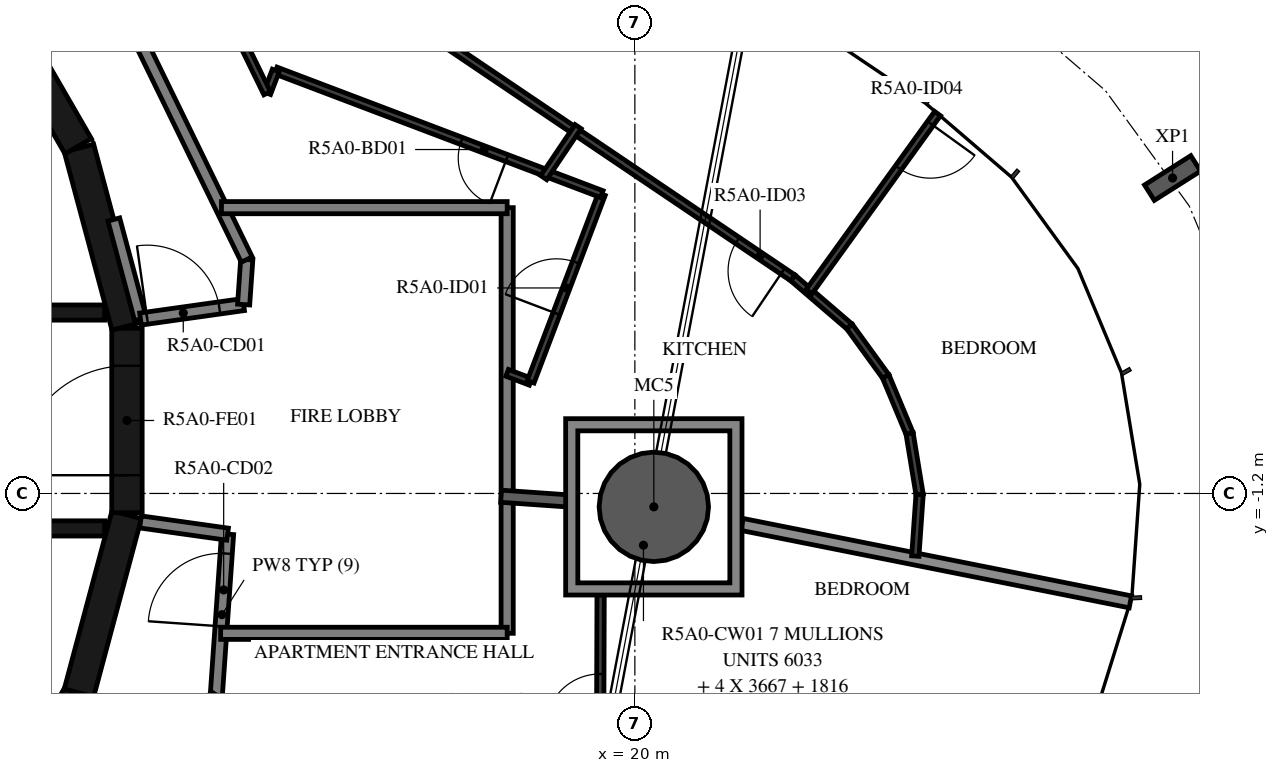
"""IFC4 building model, lengths in metres.
Left out: names, types, materials, properties, quantities, classifications, styles, units other than length and angle.
Written with IfcOpenShell. Run it as: python <this file> out.ifc"""

import sys

from ifc_helpers import new_model, si_unit, direction, frame, frame_2d, origin, origin_2d, place, context, subcontext, project, spatial, polyline, rectangle, hollow_circle, i_section, outline, extrude, element, fill, save


model = new_model("IFC4")
c1 = context("Model", 3, precision=1e-05, world=origin(), true_north=direction((0.0, 1.0)))
c2 = subcontext(c1, "Body", "Model", "MODEL_VIEW")
j1 = project(units=[si_unit("LENGTHUNIT", "METRE"), si_unit("PLANEANGLEUNIT", "RADIAN")], contexts=[c1])
p1 = place(None, origin())
s1 = spatial("IfcSite", under=j1, at=p1, CompositionType="ELEMENT")
p2 = place(p1, origin())
s2 = spatial("IfcBuilding", under=s1, at=p2, CompositionType="ELEMENT")
p3 = place(p2, frame((0.0, 0.0, 195.4)))
s3 = spatial("IfcBuildingStorey", under=s2, at=p3, CompositionType="ELEMENT", Elevation=195.4)
p4 = place(p3, frame((20.312, -1.42, -0.38), z_axis=(0.0, 0.0, 1.0), x_axis=(1.0, 0.0, 0.0)))
e1 = element("IfcColumn", 1, at=p4, inside=s3, PredefinedType="COLUMN", context=c2, shape_type="SweptSolid", body=[
    extrude(hollow_circle(Radius=0.9, WallThickness=0.04, at=origin_2d()), origin(), (0.0, 0.0, 1.0), 3.5),
])
p5 = place(p3, frame((28.842, 3.987, -0.38), z_axis=(0.0, 0.0, 1.0), x_axis=(0.535400283339, -0.844598446956, 0.0)))
e2 = element("IfcColumn", 2, at=p5, inside=s3, PredefinedType="COLUMN", context=c2, shape_type="SweptSolid", body=[
    extrude(i_section(OverallWidth=0.3, OverallDepth=0.9, WebThickness=0.019, FlangeThickness=0.035, FilletRadius=0.03, at=origin_2d()), origin(), (0.0, 0.0, 1.0), 3.5),
])
for number, where, z_axis, x_axis in (
    (3, (9.329, -7.137, 0.0), (0.0, 0.0, 1.0), (0.5, 0.866, 0.0)),
    (4, (10.858, -4.479, 0.0), (0.0, 0.0, 1.0), (0.259, 0.966, 0.0)),
):
    element("IfcWall", number, at=place(p3, frame(where, z_axis=z_axis, x_axis=x_axis)), inside=s3, PredefinedType="SHEAR", context=c2, shape_type="SweptSolid", body=[
        extrude(rectangle(XDim=3.033, YDim=0.5, at=frame_2d((1.516, 0.0))), origin(), (0.0, 0.0, 1.0), 3.12),
    ])
p6 = place(p3, frame((11.647, -1.516, 0.0), z_axis=(0.0, 0.0, 1.0), x_axis=(0.0, 1.0, 0.0)))
e5 = element("IfcWall", 5, at=p6, inside=s3, PredefinedType="SHEAR", context=c2, shape_type="SweptSolid", body=[
    extrude(rectangle(XDim=3.033, YDim=0.5, at=frame_2d((1.516, 0.0))), origin(), (0.0, 0.0, 1.0), 3.12),
])
p7 = place(p6, frame((0.616, 0.0, 0.0)))
e6 = element("IfcOpeningElement", 6, at=p7, cuts=e5, PredefinedType="OPENING", context=c2, shape_type="SweptSolid", body=[
    extrude(rectangle(XDim=1.8, YDim=2.1, at=frame_2d((0.9, 1.05))), frame((0.0, 0.26, 0.0), z_axis=(0.0, -1.0, 0.0), x_axis=(1.0, 0.0, 0.0)), (0.0, 0.0, 1.0), 0.52),
])
for number, where, z_axis, x_axis in (
    (7, (11.643, 1.55, 0.0), (0.0, 0.0, 1.0), (-0.259, 0.966, 0.0)),
    (8, (10.845, 4.51, 0.0), (0.0, 0.0, 1.0), (-0.5, 0.866, 0.0)),
):
    element("IfcWall", number, at=place(p3, frame(where, z_axis=z_axis, x_axis=x_axis)), inside=s3, PredefinedType="SHEAR", context=c2, shape_type="SweptSolid", body=[
        extrude(rectangle(XDim=3.033, YDim=0.5, at=frame_2d((1.516, 0.0))), origin(), (0.0, 0.0, 1.0), 3.12),
    ])
p8 = place(p3, frame((3.35, 1.775, 0.0), z_axis=(0.0, 0.0, 1.0), x_axis=(1.0, 0.0, 0.0)))
e9 = element("IfcWall", 9, at=p8, inside=s3, PredefinedType="SHEAR", context=c2, shape_type="SweptSolid", body=[
    extrude(rectangle(XDim=7.93, YDim=0.25, at=frame_2d((3.965, 0.0))), origin(), (0.0, 0.0, 1.0), 3.12),
])
p9 = place(p8, frame((0.35, 0.0, 0.0)))
e10 = element("IfcOpeningElement", 10, at=p9, cuts=e9, PredefinedType="OPENING", context=c2, shape_type="SweptSolid", body=[
    extrude(rectangle(XDim=1.2, YDim=2.4, at=frame_2d((0.6, 1.2))), frame((0.0, 0.135, 0.0), z_axis=(0.0, -1.0, 0.0), x_axis=(1.0, 0.0, 0.0)), (0.0, 0.0, 1.0), 0.27),
])
p10 = place(p8, frame((2.5, 0.0, 0.0)))
e11 = element("IfcOpeningElement", 11, at=p10, cuts=e9, PredefinedType="OPENING", context=c2, shape_type="SweptSolid", body=[
    extrude(rectangle(XDim=1.2, YDim=2.4, at=frame_2d((0.6, 1.2))), frame((0.0, 0.135, 0.0), z_axis=(0.0, -1.0, 0.0), x_axis=(1.0, 0.0, 0.0)), (0.0, 0.0, 1.0), 0.27),
])
p11 = place(p8, frame((4.8, 0.0, 0.0)))
e12 = element("IfcOpeningElement", 12, at=p11, cuts=e9, PredefinedType="OPENING", context=c2, shape_type="SweptSolid", body=[
    extrude(rectangle(XDim=0.9, YDim=2.1, at=frame_2d((0.45, 1.05))), frame((0.0, 0.135, 0.0), z_axis=(0.0, -1.0, 0.0), x_axis=(1.0, 0.0, 0.0)), (0.0, 0.0, 1.0), 0.27),
])
p12 = place(p3, frame((3.35, -1.775, 0.0), z_axis=(0.0, 0.0, 1.0), x_axis=(1.0, 0.0, 0.0)))
e13 = element("IfcWall", 13, at=p12, inside=s3, PredefinedType="SHEAR", context=c2, shape_type="SweptSolid", body=[
    extrude(rectangle(XDim=7.93, YDim=0.25, at=frame_2d((3.965, 0.0))), origin(), (0.0, 0.0, 1.0), 3.12),
])
p13 = place(p12, frame((0.4, 0.0, 0.0)))
e14 = element("IfcOpeningElement", 14, at=p13, cuts=e13, PredefinedType="OPENING", context=c2, shape_type="SweptSolid", body=[
    extrude(rectangle(XDim=1.1, YDim=2.4, at=frame_2d((0.55, 1.2))), frame((0.0, 0.135, 0.0), z_axis=(0.0, -1.0, 0.0), x_axis=(1.0, 0.0, 0.0)), (0.0, 0.0, 1.0), 0.27),
])
p14 = place(p12, frame((2.55, 0.0, 0.0)))
e15 = element("IfcOpeningElement", 15, at=p14, cuts=e13, PredefinedType="OPENING", context=c2, shape_type="SweptSolid", body=[
    extrude(rectangle(XDim=1.1, YDim=2.4, at=frame_2d((0.55, 1.2))), frame((0.0, 0.135, 0.0), z_axis=(0.0, -1.0, 0.0), x_axis=(1.0, 0.0, 0.0)), (0.0, 0.0, 1.0), 0.27),
])
p15 = place(p12, frame((4.7, 0.0, 0.0)))
e16 = element("IfcOpeningElement", 16, at=p15, cuts=e13, PredefinedType="OPENING", context=c2, shape_type="SweptSolid", body=[
    extrude(rectangle(XDim=1.1, YDim=2.4, at=frame_2d((0.55, 1.2))), frame((0.0, 0.135, 0.0), z_axis=(0.0, -1.0, 0.0), x_axis=(1.0, 0.0, 0.0)), (0.0, 0.0, 1.0), 0.27),
])
p16 = place(p3, frame((11.87, 1.668, 0.0), z_axis=(0.0, 0.0, 1.0), x_axis=(-0.258836880648, 0.965921047093, 0.0)))
e17 = element("IfcWall", 17, at=p16, inside=s3, PredefinedType="STANDARD", context=c2, shape_type="SweptSolid", body=[
    extrude(rectangle(XDim=1.695, YDim=0.2, at=frame_2d((0.848, 0.0))), origin(), (0.0, 0.0, 1.0), 3.12),
])
p17 = place(p3, frame((11.87, 1.668, 0.0), z_axis=(0.0, 0.0, 1.0), x_axis=(0.990271931984, 0.139145609792, 0.0)))
e18 = element("IfcWall", 18, at=p17, inside=s3, PredefinedType="STANDARD", context=c2, shape_type="SweptSolid", body=[
    extrude(rectangle(XDim=1.712, YDim=0.2, at=frame_2d((0.856, 0.0))), origin(), (0.0, 0.0, 1.0), 3.12),
])
p18 = place(p17, frame((0.11, 0.0, 0.0)))
e19 = element("IfcOpeningElement", 19, at=p18, cuts=e18, PredefinedType="OPENING", context=c2, shape_type="SweptSolid", body=[
    extrude(rectangle(XDim=1.2, YDim=2.1, at=frame_2d((0.6, 1.05))), frame((0.0, 0.11, 0.0), z_axis=(0.0, -1.0, 0.0), x_axis=(1.0, 0.0, 0.0)), (0.0, 0.0, 1.0), 0.22),
])
p19 = place(p3, frame((13.566, 1.906, 0.0), z_axis=(0.0, 0.0, 1.0), x_axis=(0.07005495793, 0.997543133338, 0.0)))
e20 = element("IfcWall", 20, at=p19, inside=s3, PredefinedType="STANDARD", context=c2, shape_type="SweptSolid", body=[
    extrude(rectangle(XDim=0.742, YDim=0.2, at=frame_2d((0.371, 0.0))), origin(), (0.0, 0.0, 1.0), 3.12),
])
p20 = place(p3, frame((13.618, 2.647, 0.0), z_axis=(0.0, 0.0, 1.0), x_axis=(-0.438366026218, 0.898796543751, 0.0)))
e21 = element("IfcWall", 21, at=p20, inside=s3, PredefinedType="STANDARD", context=c2, shape_type="SweptSolid", body=[
    extrude(rectangle(XDim=7.181, YDim=0.2, at=frame_2d((3.591, 0.0))), origin(), (0.0, 0.0, 1.0), 3.12),
])
p21 = place(p3, frame((13.117, -4.517, 0.0), z_axis=(0.0, 0.0, 1.0), x_axis=(0.069736659613, 0.997565435601, 0.0)))
e22 = element("IfcWall", 22, at=p21, inside=s3, PredefinedType="STANDARD", context=c2, shape_type="SweptSolid", body=[
    extrude(rectangle(XDim=2.654, YDim=0.2, at=frame_2d((1.327, 0.0))), origin(), (0.0, 0.0, 1.0), 3.12),
])
p22 = place(p21, frame((1.134, 0.0, 0.0)))
e23 = element("IfcOpeningElement", 23, at=p22, cuts=e22, PredefinedType="OPENING", context=c2, shape_type="SweptSolid", body=[
    extrude(rectangle(XDim=1.2, YDim=2.1, at=frame_2d((0.6, 1.05))), frame((0.0, 0.11, 0.0), z_axis=(0.0, -1.0, 0.0), x_axis=(1.0, 0.0, 0.0)), (0.0, 0.0, 1.0), 0.22),
])
p23 = place(p3, frame((13.302, -1.869, 0.0), z_axis=(0.0, 0.0, 1.0), x_axis=(-0.990274397042, 0.13912806533, 0.0)))
e24 = element("IfcWall", 24, at=p23, inside=s3, PredefinedType="STANDARD", context=c2, shape_type="SweptSolid", body=[
    extrude(rectangle(XDim=1.446, YDim=0.2, at=frame_2d((0.723, 0.0))), origin(), (0.0, 0.0, 1.0), 3.12),
])
p24 = place(p3, frame((9.101, -10.47, 0.0), z_axis=(0.0, 0.0, 1.0), x_axis=(0.559195469534, 0.829035841718, 0.0)))
e25 = element("IfcWall", 25, at=p24, inside=s3, PredefinedType="STANDARD", context=c2, shape_type="SweptSolid", body=[
    extrude(rectangle(XDim=7.181, YDim=0.2, at=frame_2d((3.591, 0.0))), origin(), (0.0, 0.0, 1.0), 3.12),
])
p25 = place(p3, frame((17.9, -3.5, 0.0), z_axis=(0.0, 0.0, 1.0), x_axis=(0.0, 1.0, 0.0)))
e26 = element("IfcWall", 26, at=p25, inside=s3, PredefinedType="STANDARD", context=c2, shape_type="SweptSolid", body=[
    extrude(rectangle(XDim=7.0, YDim=0.2, at=frame_2d((3.5, 0.0))), origin(), (0.0, 0.0, 1.0), 3.12),
])
p26 = place(p3, frame((17.9, 3.5, 0.0), z_axis=(0.0, 0.0, 1.0), x_axis=(-1.0, 0.0, 0.0)))
e27 = element("IfcWall", 27, at=p26, inside=s3, PredefinedType="STANDARD", context=c2, shape_type="SweptSolid", body=[
    extrude(rectangle(XDim=4.698, YDim=0.2, at=frame_2d((2.349, 0.0))), origin(), (0.0, 0.0, 1.0), 3.12),
])
p27 = place(p3, frame((13.188, -3.5, 0.0), z_axis=(0.0, 0.0, 1.0), x_axis=(1.0, 0.0, 0.0)))
e28 = element("IfcWall", 28, at=p27, inside=s3, PredefinedType="STANDARD", context=c2, shape_type="SweptSolid", body=[
    extrude(rectangle(XDim=4.712, YDim=0.2, at=frame_2d((2.356, 0.0))), origin(), (0.0, 0.0, 1.0), 3.12),
])
p28 = place(p3, frame((21.762, -1.709, 0.0), z_axis=(0.0, 0.0, 1.0), x_axis=(0.980707365343, -0.195481619501, 0.0)))
e29 = element("IfcWall", 29, at=p28, inside=s3, PredefinedType="STANDARD", context=c2, shape_type="SweptSolid", body=[
    extrude(rectangle(XDim=6.512, YDim=0.2, at=frame_2d((3.256, 0.0))), origin(), (0.0, 0.0, 1.0), 2.73),
])
p29 = place(p3, frame((17.8, -1.246, 0.0), z_axis=(0.0, 0.0, 1.0), x_axis=(0.997562681713, -0.069776042122, 0.0)))
e30 = element("IfcWall", 30, at=p29, inside=s3, PredefinedType="STANDARD", context=c2, shape_type="SweptSolid", body=[
    extrude(rectangle(XDim=1.144, YDim=0.2, at=frame_2d((0.572, 0.0))), origin(), (0.0, 0.0, 1.0), 3.12),
])
p30 = place(p3, frame((17.9, 0.783, 0.0), z_axis=(0.0, 0.0, 1.0), x_axis=(0.93513272442, -0.354297597677, 0.0)))
e31 = element("IfcWall", 31, at=p30, inside=s3, PredefinedType="PARTITIONING", context=c2, shape_type="SweptSolid", body=[
    extrude(rectangle(XDim=0.413, YDim=0.12, at=frame_2d((0.207, 0.0))), origin(), (0.0, 0.0, 1.0), 3.12),
])
p31 = place(p3, frame((18.286, 0.637, 0.0), z_axis=(0.0, 0.0, 1.0), x_axis=(0.354672075988, 0.934990758518, 0.0)))
e32 = element("IfcWall", 32, at=p31, inside=s3, PredefinedType="PARTITIONING", context=c2, shape_type="SweptSolid", body=[
    extrude(rectangle(XDim=3.3, YDim=0.12, at=frame_2d((1.65, 0.0))), origin(), (0.0, 0.0, 1.0), 3.12),
])
p32 = place(p31, frame((1.2, 0.0, 0.0)))
e33 = element("IfcOpeningElement", 33, at=p32, cuts=e32, PredefinedType="OPENING", context=c2, shape_type="SweptSolid", body=[
    extrude(rectangle(XDim=0.9, YDim=2.1, at=frame_2d((0.45, 1.05))), frame((0.0, 0.07, 0.0), z_axis=(0.0, -1.0, 0.0), x_axis=(1.0, 0.0, 0.0)), (0.0, 0.0, 1.0), 0.14),
])
p33 = place(p3, frame((19.456, 3.722, 0.0), z_axis=(0.0, 0.0, 1.0), x_axis=(-0.935017484321, 0.3546016131, 0.0)))
e34 = element("IfcWall", 34, at=p33, inside=s3, PredefinedType="PARTITIONING", context=c2, shape_type="SweptSolid", body=[
    extrude(rectangle(XDim=5.734, YDim=0.12, at=frame_2d((2.867, 0.0))), origin(), (0.0, 0.0, 1.0), 3.12),
])
p34 = place(p33, frame((1.669, 0.0, 0.0)))
e35 = element("IfcOpeningElement", 35, at=p34, cuts=e34, PredefinedType="OPENING", context=c2, shape_type="SweptSolid", body=[
    extrude(rectangle(XDim=0.8, YDim=2.1, at=frame_2d((0.4, 1.05))), frame((0.0, 0.07, 0.0), z_axis=(0.0, -1.0, 0.0), x_axis=(1.0, 0.0, 0.0)), (0.0, 0.0, 1.0), 0.14),
])
p35 = place(p3, frame((14.094, 5.756, 0.0), z_axis=(0.0, 0.0, 1.0), x_axis=(-0.354267529254, -0.935144116014, 0.0)))
e36 = element("IfcWall", 36, at=p35, inside=s3, PredefinedType="PARTITIONING", context=c2, shape_type="SweptSolid", body=[
    extrude(rectangle(XDim=0.4, YDim=0.12, at=frame_2d((0.2, 0.0))), origin(), (0.0, 0.0, 1.0), 3.12),
])
p36 = place(p3, frame((13.953, 5.382, 0.0), z_axis=(0.0, 0.0, 1.0), x_axis=(-0.438382107355, 0.898788700391, 0.0)))
e37 = element("IfcWall", 37, at=p36, inside=s3, PredefinedType="PARTITIONING", context=c2, shape_type="SweptSolid", body=[
    extrude(rectangle(XDim=4.634, YDim=0.12, at=frame_2d((2.317, 0.0))), origin(), (0.0, 0.0, 1.0), 3.12),
])
p37 = place(p3, frame((22.598, 2.345, 0.0), z_axis=(0.0, 0.0, 1.0), x_axis=(0.758596166141, -0.651561092083, 0.0)))
e38 = element("IfcWall", 38, at=p37, inside=s3, PredefinedType="PARTITIONING", context=c2, shape_type="SweptSolid", body=[
    extrude(rectangle(XDim=1.227, YDim=0.12, at=frame_2d((0.614, 0.0))), origin(), (0.0, 0.0, 1.0), 3.12),
])
p38 = place(p3, frame((23.529, 1.545, 0.0), z_axis=(0.0, 0.0, 1.0), x_axis=(0.587742994292, -0.809047694923, 0.0)))
e39 = element("IfcWall", 39, at=p38, inside=s3, PredefinedType="PARTITIONING", context=c2, shape_type="SweptSolid", body=[
    extrude(rectangle(XDim=1.016, YDim=0.12, at=frame_2d((0.508, 0.0))), origin(), (0.0, 0.0, 1.0), 3.12),
])
for number, where, z_axis, x_axis in (
    (40, (24.126, 0.723, 0.0), (0.0, 0.0, 1.0), (0.385, -0.923, 0.0)),
    (41, (24.518, -0.214, 0.0), (0.0, 0.0, 1.0), (0.162, -0.987, 0.0)),
    (42, (24.683, -1.217, 0.0), (0.0, 0.0, 1.0), (-0.07, -0.998, 0.0)),
):
    element("IfcWall", number, at=place(p3, frame(where, z_axis=z_axis, x_axis=x_axis)), inside=s3, PredefinedType="PARTITIONING", context=c2, shape_type="SweptSolid", body=[
        extrude(rectangle(XDim=1.016, YDim=0.12, at=frame_2d((0.508, 0.0))), origin(), (0.0, 0.0, 1.0), 3.12),
    ])
p39 = place(p3, frame((24.978, 5.047, 0.0), z_axis=(0.0, 0.0, 1.0), x_axis=(-0.585041443684, -0.811003396523, 0.0)))
e43 = element("IfcWall", 43, at=p39, inside=s3, PredefinedType="PARTITIONING", context=c2, shape_type="SweptSolid", body=[
    extrude(rectangle(XDim=3.613, YDim=0.12, at=frame_2d((1.807, 0.0))), origin(), (0.0, 0.0, 1.0), 3.12),
])
p40 = place(p39, frame((0.2, 0.0, 0.0)))
e44 = element("IfcOpeningElement", 44, at=p40, cuts=e43, PredefinedType="OPENING", context=c2, shape_type="SweptSolid", body=[
    extrude(rectangle(XDim=0.9, YDim=2.1, at=frame_2d((0.45, 1.05))), frame((0.0, 0.07, 0.0), z_axis=(0.0, -1.0, 0.0), x_axis=(1.0, 0.0, 0.0)), (0.0, 0.0, 1.0), 0.14),
])
p41 = place(p3, frame((22.598, 2.345, 0.0), z_axis=(0.0, 0.0, 1.0), x_axis=(-0.829034113947, 0.559198031034, 0.0)))
e45 = element("IfcWall", 45, at=p41, inside=s3, PredefinedType="PARTITIONING", context=c2, shape_type="SweptSolid", body=[
    extrude(rectangle(XDim=12.879, YDim=0.12, at=frame_2d((6.439, 0.0))), origin(), (0.0, 0.0, 1.0), 3.12),
])
p42 = place(p41, frame((0.2, 0.0, 0.0)))
e46 = element("IfcOpeningElement", 46, at=p42, cuts=e45, PredefinedType="OPENING", context=c2, shape_type="SweptSolid", body=[
    extrude(rectangle(XDim=0.9, YDim=2.1, at=frame_2d((0.45, 1.05))), frame((0.0, 0.07, 0.0), z_axis=(0.0, -1.0, 0.0), x_axis=(1.0, 0.0, 0.0)), (0.0, 0.0, 1.0), 0.14),
])
p43 = place(p3, frame((19.067, 4.832, 0.0), z_axis=(0.0, 0.0, 1.0), x_axis=(-0.559257363459, -0.828994090098, 0.0)))
e47 = element("IfcWall", 47, at=p43, inside=s3, PredefinedType="PARTITIONING", context=c2, shape_type="SweptSolid", body=[
    extrude(rectangle(XDim=1.012, YDim=0.12, at=frame_2d((0.506, 0.0))), origin(), (0.0, 0.0, 1.0), 3.12),
])
p44 = place(p3, frame((19.429, -5.268, 0.0), z_axis=(0.0, 0.0, 1.0), x_axis=(0.003360127656, 0.999994354755, 0.0)))
e48 = element("IfcWall", 48, at=p44, inside=s3, PredefinedType="PARTITIONING", context=c2, shape_type="SweptSolid", body=[
    extrude(rectangle(XDim=2.398, YDim=0.12, at=frame_2d((1.199, 0.0))), origin(), (0.0, 0.0, 1.0), 3.12),
])
p45 = place(p44, frame((0.2, 0.0, 0.0)))
e49 = element("IfcOpeningElement", 49, at=p45, cuts=e48, PredefinedType="OPENING", context=c2, shape_type="SweptSolid", body=[
    extrude(rectangle(XDim=0.9, YDim=2.1, at=frame_2d((0.45, 1.05))), frame((0.0, 0.07, 0.0), z_axis=(0.0, -1.0, 0.0), x_axis=(1.0, 0.0, 0.0)), (0.0, 0.0, 1.0), 0.14),
])
p46 = place(p3, origin())
e50 = element("IfcWall", 50, at=p46, inside=s3, PredefinedType="STANDARD", context=c2, shape_type="SweptSolid", body=[
    extrude(outline(polyline([(21.762, 0.03), (21.762, -2.87), (18.862, -2.87), (18.862, 0.03), (21.762, 0.03)]), holes=[polyline([(19.062, -2.67), (21.562, -2.67), (21.562, -0.17), (19.062, -0.17), (19.062, -2.67)])]), origin(), (0.0, 0.0, 1.0), 3.12),
])
p47 = place(p7, origin())
e51 = element("IfcDoor", 51, at=p47, inside=s3, OperationType="DOUBLE_DOOR_SINGLE_SWING", PredefinedType="DOOR", context=c2, shape_type="SweptSolid", body=[
    extrude(rectangle(XDim=1.8, YDim=2.1, at=frame_2d((0.9, 1.05))), frame((0.0, 0.025, 0.0), z_axis=(0.0, -1.0, 0.0), x_axis=(1.0, 0.0, 0.0)), (0.0, 0.0, 1.0), 0.05),
])
fill(e6, e51)
p48 = place(p32, origin())
e52 = element("IfcDoor", 52, at=p48, inside=s3, OperationType="SINGLE_SWING_LEFT", PredefinedType="DOOR", context=c2, shape_type="SweptSolid", body=[
    extrude(rectangle(XDim=0.9, YDim=2.1, at=frame_2d((0.45, 1.05))), frame((0.0, 0.025, 0.0), z_axis=(0.0, -1.0, 0.0), x_axis=(1.0, 0.0, 0.0)), (0.0, 0.0, 1.0), 0.05),
])
fill(e33, e52)
p49 = place(p34, origin())
e53 = element("IfcDoor", 53, at=p49, inside=s3, OperationType="SINGLE_SWING_LEFT", PredefinedType="DOOR", context=c2, shape_type="SweptSolid", body=[
    extrude(rectangle(XDim=0.8, YDim=2.1, at=frame_2d((0.4, 1.05))), frame((0.0, 0.025, 0.0), z_axis=(0.0, -1.0, 0.0), x_axis=(1.0, 0.0, 0.0)), (0.0, 0.0, 1.0), 0.05),
])
fill(e35, e53)
p50 = place(p42, origin())
e54 = element("IfcDoor", 54, at=p50, inside=s3, OperationType="SINGLE_SWING_LEFT", PredefinedType="DOOR", context=c2, shape_type="SweptSolid", body=[
    extrude(rectangle(XDim=0.9, YDim=2.1, at=frame_2d((0.45, 1.05))), frame((0.0, 0.025, 0.0), z_axis=(0.0, -1.0, 0.0), x_axis=(1.0, 0.0, 0.0)), (0.0, 0.0, 1.0), 0.05),
])
fill(e46, e54)
p51 = place(p40, origin())
e55 = element("IfcDoor", 55, at=p51, inside=s3, OperationType="SINGLE_SWING_LEFT", PredefinedType="DOOR", context=c2, shape_type="SweptSolid", body=[
    extrude(rectangle(XDim=0.9, YDim=2.1, at=frame_2d((0.45, 1.05))), frame((0.0, 0.025, 0.0), z_axis=(0.0, -1.0, 0.0), x_axis=(1.0, 0.0, 0.0)), (0.0, 0.0, 1.0), 0.05),
])
fill(e44, e55)
p52 = place(p45, origin())
e56 = element("IfcDoor", 56, at=p52, inside=s3, OperationType="SINGLE_SWING_RIGHT", PredefinedType="DOOR", context=c2, shape_type="SweptSolid", body=[
    extrude(rectangle(XDim=0.9, YDim=2.1, at=frame_2d((0.45, 1.05))), frame((0.0, 0.025, 0.0), z_axis=(0.0, -1.0, 0.0), x_axis=(1.0, 0.0, 0.0)), (0.0, 0.0, 1.0), 0.05),
])
fill(e49, e56)
p53 = place(p18, origin())
e57 = element("IfcDoor", 57, at=p53, inside=s3, OperationType="DOUBLE_DOOR_SINGLE_SWING", PredefinedType="DOOR", context=c2, shape_type="SweptSolid", body=[
    extrude(rectangle(XDim=1.2, YDim=2.1, at=frame_2d((0.6, 1.05))), frame((0.0, 0.025, 0.0), z_axis=(0.0, -1.0, 0.0), x_axis=(1.0, 0.0, 0.0)), (0.0, 0.0, 1.0), 0.05),
])
fill(e19, e57)
p54 = place(p22, origin())
e58 = element("IfcDoor", 58, at=p54, inside=s3, OperationType="DOUBLE_DOOR_SINGLE_SWING", PredefinedType="DOOR", context=c2, shape_type="SweptSolid", body=[
    extrude(rectangle(XDim=1.2, YDim=2.1, at=frame_2d((0.6, 1.05))), frame((0.0, 0.025, 0.0), z_axis=(0.0, -1.0, 0.0), x_axis=(1.0, 0.0, 0.0)), (0.0, 0.0, 1.0), 0.05),
])
fill(e23, e58)
save(model, sys.argv[1])
